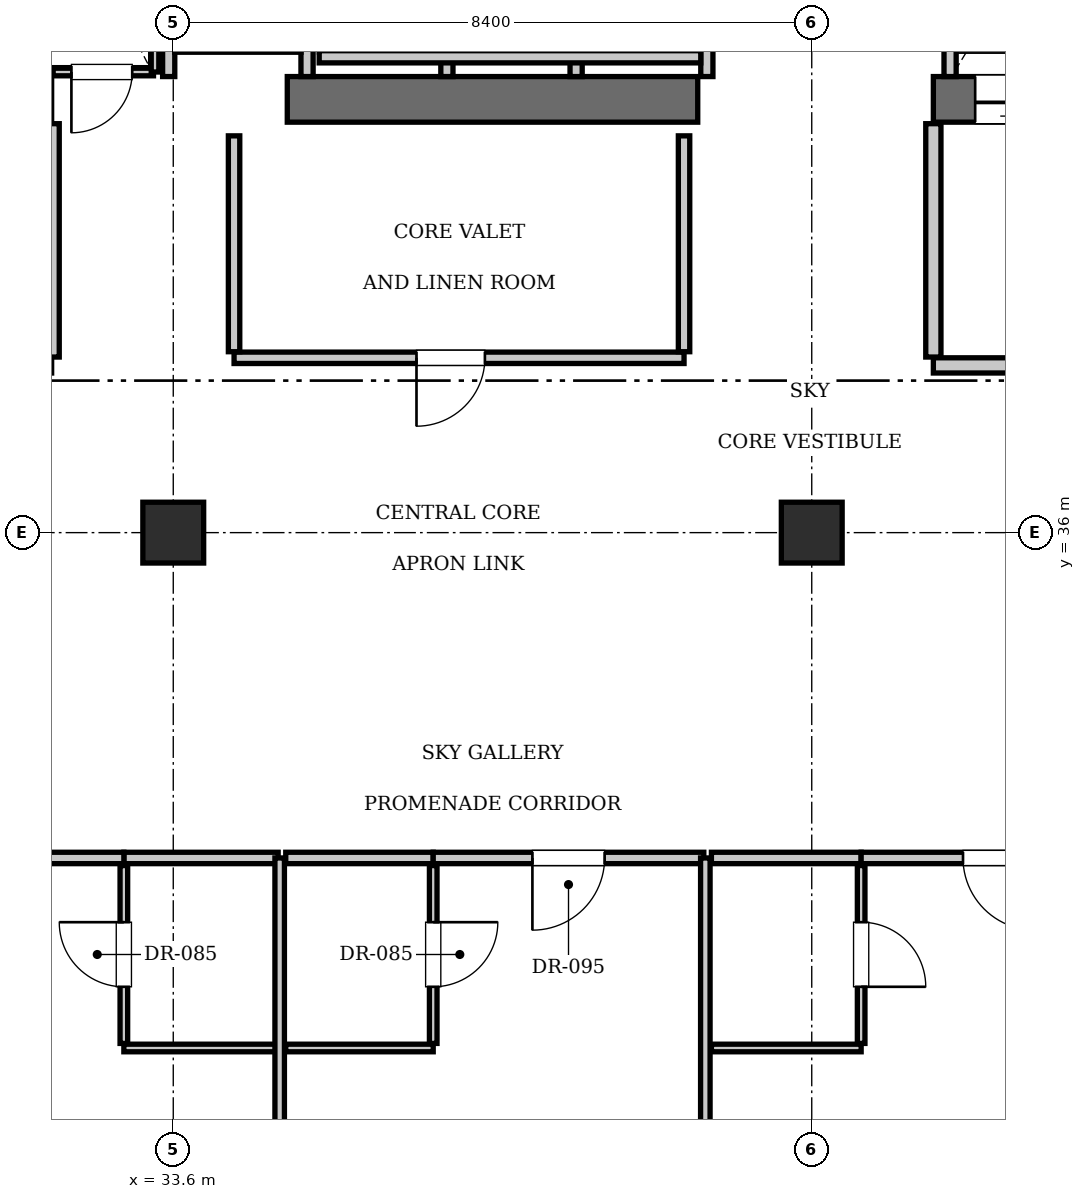
"""IFC4 building model, lengths in metres.
Left out: names, types, materials, properties, quantities, classifications, styles, units other than length and angle.
Written with IfcOpenShell. Run it as: python <this file> out.ifc"""

import sys

from ifc_helpers import new_model, si_unit, direction, frame, frame_2d, origin, origin_2d, place, context, subcontext, project, spatial, rectangle, extrude, element, fill, save


model = new_model("IFC4")
c1 = context("Model", 3, precision=1e-05, world=origin(), true_north=direction((0.0, 1.0)))
c2 = subcontext(c1, "Body", "Model", "MODEL_VIEW")
j1 = project(units=[si_unit("LENGTHUNIT", "METRE"), si_unit("PLANEANGLEUNIT", "RADIAN")], contexts=[c1])
p1 = place(None, origin())
s1 = spatial("IfcSite", under=j1, at=p1, CompositionType="ELEMENT")
p2 = place(p1, origin())
s2 = spatial("IfcBuilding", under=s1, at=p2, CompositionType="ELEMENT")
p3 = place(p2, frame((0.0, 0.0, 329.7)))
s3 = spatial("IfcBuildingStorey", under=s2, at=p3, CompositionType="ELEMENT", Elevation=329.7)
p4 = place(p3, frame((35.1, 41.7, 0.0), z_axis=(0.0, 0.0, 1.0), x_axis=(1.0, 0.0, 0.0)))
e1 = element("IfcWall", 1, at=p4, inside=s3, PredefinedType="SHEAR", context=c2, shape_type="SweptSolid", body=[
    extrude(rectangle(XDim=5.4, YDim=0.6, at=frame_2d((2.7, 0.0))), origin(), (0.0, 0.0, 1.0), 3.85),
])
p5 = place(p3, frame((43.6, 41.7, 0.0), z_axis=(0.0, 0.0, 1.0), x_axis=(1.0, 0.0, 0.0)))
e2 = element("IfcWall", 2, at=p5, inside=s3, PredefinedType="SHEAR", context=c2, shape_type="SweptSolid", body=[
    extrude(rectangle(XDim=6.8, YDim=0.6, at=frame_2d((3.4, 0.0))), origin(), (0.0, 0.0, 1.0), 3.85),
])
p6 = place(p5, frame((3.9, 0.0, 0.0)))
e3 = element("IfcOpeningElement", 3, at=p6, cuts=e2, PredefinedType="OPENING", context=c2, shape_type="SweptSolid", body=[
    extrude(rectangle(XDim=1.15, YDim=2.15, at=frame_2d((0.575, 1.075))), frame((0.0, 0.31, 0.0), z_axis=(0.0, -1.0, 0.0), x_axis=(1.0, 0.0, 0.0)), (0.0, 0.0, 1.0), 0.62),
])
p7 = place(p5, frame((0.55, 0.0, 0.0)))
e4 = element("IfcOpeningElement", 4, at=p7, cuts=e2, PredefinedType="OPENING", context=c2, shape_type="SweptSolid", body=[
    extrude(rectangle(XDim=1.1, YDim=2.2, at=frame_2d((0.55, 1.1))), frame((0.0, 0.31, 0.0), z_axis=(0.0, -1.0, 0.0), x_axis=(1.0, 0.0, 0.0)), (0.0, 0.0, 1.0), 0.62),
])
for number, where, z_axis, x_axis in (
    (5, (33.6, 36.0, 0.0), (0.0, 0.0, 1.0), (1.0, 0.0, 0.0)),
    (6, (42.0, 36.0, 0.0), (0.0, 0.0, 1.0), (1.0, 0.0, 0.0)),
):
    element("IfcColumn", number, at=place(p3, frame(where, z_axis=z_axis, x_axis=x_axis)), inside=s3, PredefinedType="COLUMN", context=c2, shape_type="SweptSolid", body=[
        extrude(rectangle(XDim=0.8, YDim=0.8, at=origin_2d()), origin(), (0.0, 0.0, 1.0), 3.85),
    ])
p8 = place(p3, frame((43.82, 42.0, 0.0), z_axis=(0.0, 0.0, 1.0), x_axis=(0.0, 1.0, 0.0)))
e7 = element("IfcWall", 7, at=p8, inside=s3, PredefinedType="SOLIDWALL", context=c2, shape_type="SweptSolid", body=[
    extrude(rectangle(XDim=2.74, YDim=0.16, at=frame_2d((1.37, 0.0))), origin(), (0.0, 0.0, 1.0), 3.61),
])
for number, where, z_axis, x_axis in (
    (8, (37.2, 42.0, 0.0), (0.0, 0.0, 1.0), (0.0, 1.0, 0.0)),
    (9, (38.9, 42.0, 0.0), (0.0, 0.0, 1.0), (0.0, 1.0, 0.0)),
    (10, (40.62, 42.0, 0.0), (0.0, 0.0, 1.0), (0.0, 1.0, 0.0)),
):
    element("IfcWall", number, at=place(p3, frame(where, z_axis=z_axis, x_axis=x_axis)), inside=s3, PredefinedType="SOLIDWALL", context=c2, shape_type="SweptSolid", body=[
        extrude(rectangle(XDim=2.35, YDim=0.16, at=frame_2d((1.175, 0.0))), origin(), (0.0, 0.0, 1.0), 3.61),
    ])
p9 = place(p3, frame((35.52, 42.26, 0.0), z_axis=(0.0, 0.0, 1.0), x_axis=(1.0, 0.0, 0.0)))
e11 = element("IfcWall", 11, at=p9, inside=s3, PredefinedType="SOLIDWALL", context=c2, shape_type="SweptSolid", body=[
    extrude(rectangle(XDim=5.02, YDim=0.16, at=frame_2d((2.51, 0.0))), origin(), (0.0, 0.0, 1.0), 3.61),
])
for number, where, z_axis, x_axis in (
    (12, (33.54, 42.0, 0.0), (0.0, 0.0, 1.0), (0.0, 1.0, 0.0)),
    (13, (35.36, 42.0, 0.0), (0.0, 0.0, 1.0), (0.0, 1.0, 0.0)),
):
    element("IfcWall", number, at=place(p3, frame(where, z_axis=z_axis, x_axis=x_axis)), inside=s3, PredefinedType="SOLIDWALL", context=c2, shape_type="SweptSolid", body=[
        extrude(rectangle(XDim=2.4, YDim=0.16, at=frame_2d((1.2, 0.0))), origin(), (0.0, 0.0, 1.0), 3.61),
    ])
p10 = place(p3, frame((33.62, 42.4, 0.0), z_axis=(0.0, 0.0, 1.0), x_axis=(1.0, 0.0, 0.0)))
e14 = element("IfcWall", 14, at=p10, inside=s3, PredefinedType="SOLIDWALL", context=c2, shape_type="SweptSolid", body=[
    extrude(rectangle(XDim=1.66, YDim=0.16, at=frame_2d((0.83, 0.0))), origin(), (0.0, 0.0, 1.0), 3.61),
])
p11 = place(p3, frame((32.0, 38.31, 0.0), z_axis=(0.0, 0.0, 1.0), x_axis=(0.0, 1.0, 0.0)))
e15 = element("IfcWall", 15, at=p11, inside=s3, PredefinedType="PARTITIONING", context=c2, shape_type="SweptSolid", body=[
    extrude(rectangle(XDim=3.07, YDim=0.2, at=frame_2d((1.535, 0.0))), origin(), (0.0, 0.0, 1.0), 3.61),
])
p12 = place(p3, frame((43.6, 38.2, 0.0), z_axis=(0.0, 0.0, 1.0), x_axis=(1.0, 0.0, 0.0)))
e16 = element("IfcWall", 16, at=p12, inside=s3, PredefinedType="PARTITIONING", context=c2, shape_type="SweptSolid", body=[
    extrude(rectangle(XDim=5.8, YDim=0.2, at=frame_2d((2.9, 0.0))), origin(), (0.0, 0.0, 1.0), 3.61),
])
p13 = place(p12, frame((2.3, 0.0, 0.0)))
e17 = element("IfcOpeningElement", 17, at=p13, cuts=e16, PredefinedType="OPENING", context=c2, shape_type="SweptSolid", body=[
    extrude(rectangle(XDim=1.15, YDim=2.15, at=frame_2d((0.575, 1.075))), frame((0.0, 0.11, 0.0), z_axis=(0.0, -1.0, 0.0), x_axis=(1.0, 0.0, 0.0)), (0.0, 0.0, 1.0), 0.22),
])
p14 = place(p3, frame((43.6, 38.31, 0.0), z_axis=(0.0, 0.0, 1.0), x_axis=(0.0, 1.0, 0.0)))
e18 = element("IfcWall", 18, at=p14, inside=s3, PredefinedType="PARTITIONING", context=c2, shape_type="SweptSolid", body=[
    extrude(rectangle(XDim=3.07, YDim=0.2, at=frame_2d((1.535, 0.0))), origin(), (0.0, 0.0, 1.0), 3.61),
])
p15 = place(p3, frame((32.02, 42.06, 0.0), z_axis=(0.0, 0.0, 1.0), x_axis=(1.0, 0.0, 0.0)))
e19 = element("IfcWall", 19, at=p15, inside=s3, PredefinedType="PARTITIONING", context=c2, shape_type="SweptSolid", body=[
    extrude(rectangle(XDim=1.32, YDim=0.1, at=frame_2d((0.66, 0.0))), origin(), (0.0, 0.0, 1.0), 3.61),
])
p16 = place(p15, frame((0.24, 0.0, 0.0)))
e20 = element("IfcOpeningElement", 20, at=p16, cuts=e19, PredefinedType="OPENING", context=c2, shape_type="SweptSolid", body=[
    extrude(rectangle(XDim=0.8, YDim=2.05, at=frame_2d((0.4, 1.025))), frame((0.0, 0.06, 0.0), z_axis=(0.0, -1.0, 0.0), x_axis=(1.0, 0.0, 0.0)), (0.0, 0.0, 1.0), 0.12),
])
p17 = place(p3, frame((33.36, 42.06, 0.0), z_axis=(0.0, 0.0, 1.0), x_axis=(0.0, 1.0, 0.0)))
e21 = element("IfcWall", 21, at=p17, inside=s3, PredefinedType="PARTITIONING", context=c2, shape_type="SweptSolid", body=[
    extrude(rectangle(XDim=2.88, YDim=0.1, at=frame_2d((1.44, 0.0))), origin(), (0.0, 0.0, 1.0), 3.61),
])
p18 = place(p3, frame((34.4, 38.3, 0.0), z_axis=(0.0, 0.0, 1.0), x_axis=(1.0, 0.0, 0.0)))
e22 = element("IfcWall", 22, at=p18, inside=s3, PredefinedType="PARTITIONING", context=c2, shape_type="SweptSolid", body=[
    extrude(rectangle(XDim=5.92, YDim=0.15, at=frame_2d((2.96, 0.0))), origin(), (0.0, 0.0, 1.0), 3.61),
])
p19 = place(p18, frame((2.4, 0.0, 0.0)))
e23 = element("IfcOpeningElement", 23, at=p19, cuts=e22, PredefinedType="OPENING", context=c2, shape_type="SweptSolid", body=[
    extrude(rectangle(XDim=0.9, YDim=2.1, at=frame_2d((0.45, 1.05))), frame((0.0, 0.085, 0.0), z_axis=(0.0, -1.0, 0.0), x_axis=(1.0, 0.0, 0.0)), (0.0, 0.0, 1.0), 0.17),
])
for number, where, z_axis, x_axis in (
    (24, (34.4, 38.38, 0.0), (0.0, 0.0, 1.0), (0.0, 1.0, 0.0)),
    (25, (40.32, 38.38, 0.0), (0.0, 0.0, 1.0), (0.0, 1.0, 0.0)),
):
    element("IfcWall", number, at=place(p3, frame(where, z_axis=z_axis, x_axis=x_axis)), inside=s3, PredefinedType="PARTITIONING", context=c2, shape_type="SweptSolid", body=[
        extrude(rectangle(XDim=2.84, YDim=0.15, at=frame_2d((1.42, 0.0))), origin(), (0.0, 0.0, 1.0), 3.61),
    ])
p20 = place(p3, frame((32.95, 31.72, 0.0), z_axis=(0.0, 0.0, 1.0), x_axis=(1.0, 0.0, 0.0)))
e26 = element("IfcWall", 26, at=p20, inside=s3, PredefinedType="PARTITIONING", context=c2, shape_type="SweptSolid", body=[
    extrude(rectangle(XDim=2.03, YDim=0.15, at=frame_2d((1.015, 0.0))), origin(), (0.0, 0.0, 1.0), 3.61),
])
p21 = place(p3, frame((32.95, 29.22, 0.0), z_axis=(0.0, 0.0, 1.0), x_axis=(1.0, 0.0, 0.0)))
e27 = element("IfcWall", 27, at=p21, inside=s3, PredefinedType="PARTITIONING", context=c2, shape_type="SweptSolid", body=[
    extrude(rectangle(XDim=2.01, YDim=0.1, at=frame_2d((1.005, 0.0))), origin(), (0.0, 0.0, 1.0), 3.61),
])
p22 = place(p3, frame((32.95, 29.28, 0.0), z_axis=(0.0, 0.0, 1.0), x_axis=(0.0, 1.0, 0.0)))
e28 = element("IfcWall", 28, at=p22, inside=s3, PredefinedType="PARTITIONING", context=c2, shape_type="SweptSolid", body=[
    extrude(rectangle(XDim=2.34, YDim=0.1, at=frame_2d((1.17, 0.0))), origin(), (0.0, 0.0, 1.0), 3.61),
])
p23 = place(p22, frame((0.745, 0.0, 0.0)))
e29 = element("IfcOpeningElement", 29, at=p23, cuts=e28, PredefinedType="OPENING", context=c2, shape_type="SweptSolid", body=[
    extrude(rectangle(XDim=0.85, YDim=2.1, at=frame_2d((0.425, 1.05))), frame((0.0, 0.06, 0.0), z_axis=(0.0, -1.0, 0.0), x_axis=(1.0, 0.0, 0.0)), (0.0, 0.0, 1.0), 0.12),
])
p24 = place(p3, frame((29.32, 31.72, 0.0), z_axis=(0.0, 0.0, 1.0), x_axis=(1.0, 0.0, 0.0)))
e30 = element("IfcWall", 30, at=p24, inside=s3, PredefinedType="PARTITIONING", context=c2, shape_type="SweptSolid", body=[
    extrude(rectangle(XDim=3.63, YDim=0.15, at=frame_2d((1.815, 0.0))), origin(), (0.0, 0.0, 1.0), 3.61),
])
p25 = place(p24, frame((1.34, 0.0, 0.0)))
e31 = element("IfcOpeningElement", 31, at=p25, cuts=e30, PredefinedType="OPENING", context=c2, shape_type="SweptSolid", body=[
    extrude(rectangle(XDim=0.95, YDim=2.15, at=frame_2d((0.475, 1.075))), frame((0.0, 0.085, 0.0), z_axis=(0.0, -1.0, 0.0), x_axis=(1.0, 0.0, 0.0)), (0.0, 0.0, 1.0), 0.17),
])
p26 = place(p3, frame((35.0, 13.9, 0.0), z_axis=(0.0, 0.0, 1.0), x_axis=(0.0, 1.0, 0.0)))
e32 = element("IfcWall", 32, at=p26, inside=s3, PredefinedType="PARTITIONING", context=c2, shape_type="SweptSolid", body=[
    extrude(rectangle(XDim=17.82, YDim=0.125, at=frame_2d((8.91, 0.0))), origin(), (0.0, 0.0, 1.0), 3.61),
])
p27 = place(p3, frame((35.08, 31.72, 0.0), z_axis=(0.0, 0.0, 1.0), x_axis=(1.0, 0.0, 0.0)))
e33 = element("IfcWall", 33, at=p27, inside=s3, PredefinedType="PARTITIONING", context=c2, shape_type="SweptSolid", body=[
    extrude(rectangle(XDim=1.94, YDim=0.15, at=frame_2d((0.97, 0.0))), origin(), (0.0, 0.0, 1.0), 3.61),
])
p28 = place(p3, frame((35.08, 29.22, 0.0), z_axis=(0.0, 0.0, 1.0), x_axis=(1.0, 0.0, 0.0)))
e34 = element("IfcWall", 34, at=p28, inside=s3, PredefinedType="PARTITIONING", context=c2, shape_type="SweptSolid", body=[
    extrude(rectangle(XDim=1.94, YDim=0.1, at=frame_2d((0.97, 0.0))), origin(), (0.0, 0.0, 1.0), 3.61),
])
p29 = place(p3, frame((37.02, 29.28, 0.0), z_axis=(0.0, 0.0, 1.0), x_axis=(0.0, 1.0, 0.0)))
e35 = element("IfcWall", 35, at=p29, inside=s3, PredefinedType="PARTITIONING", context=c2, shape_type="SweptSolid", body=[
    extrude(rectangle(XDim=2.34, YDim=0.1, at=frame_2d((1.17, 0.0))), origin(), (0.0, 0.0, 1.0), 3.61),
])
p30 = place(p29, frame((0.745, 0.0, 0.0)))
e36 = element("IfcOpeningElement", 36, at=p30, cuts=e35, PredefinedType="OPENING", context=c2, shape_type="SweptSolid", body=[
    extrude(rectangle(XDim=0.85, YDim=2.1, at=frame_2d((0.425, 1.05))), frame((0.0, 0.06, 0.0), z_axis=(0.0, -1.0, 0.0), x_axis=(1.0, 0.0, 0.0)), (0.0, 0.0, 1.0), 0.12),
])
p31 = place(p3, frame((37.02, 31.72, 0.0), z_axis=(0.0, 0.0, 1.0), x_axis=(1.0, 0.0, 0.0)))
e37 = element("IfcWall", 37, at=p31, inside=s3, PredefinedType="PARTITIONING", context=c2, shape_type="SweptSolid", body=[
    extrude(rectangle(XDim=3.56, YDim=0.15, at=frame_2d((1.78, 0.0))), origin(), (0.0, 0.0, 1.0), 3.61),
])
p32 = place(p31, frame((1.305, 0.0, 0.0)))
e38 = element("IfcOpeningElement", 38, at=p32, cuts=e37, PredefinedType="OPENING", context=c2, shape_type="SweptSolid", body=[
    extrude(rectangle(XDim=0.95, YDim=2.15, at=frame_2d((0.475, 1.075))), frame((0.0, 0.085, 0.0), z_axis=(0.0, -1.0, 0.0), x_axis=(1.0, 0.0, 0.0)), (0.0, 0.0, 1.0), 0.17),
])
p33 = place(p3, frame((40.6, 13.9, 0.0), z_axis=(0.0, 0.0, 1.0), x_axis=(0.0, 1.0, 0.0)))
e39 = element("IfcWall", 39, at=p33, inside=s3, PredefinedType="PARTITIONING", context=c2, shape_type="SweptSolid", body=[
    extrude(rectangle(XDim=17.82, YDim=0.125, at=frame_2d((8.91, 0.0))), origin(), (0.0, 0.0, 1.0), 3.61),
])
p34 = place(p3, frame((40.68, 31.72, 0.0), z_axis=(0.0, 0.0, 1.0), x_axis=(1.0, 0.0, 0.0)))
e40 = element("IfcWall", 40, at=p34, inside=s3, PredefinedType="PARTITIONING", context=c2, shape_type="SweptSolid", body=[
    extrude(rectangle(XDim=1.97, YDim=0.15, at=frame_2d((0.985, 0.0))), origin(), (0.0, 0.0, 1.0), 3.61),
])
p35 = place(p3, frame((40.68, 29.22, 0.0), z_axis=(0.0, 0.0, 1.0), x_axis=(1.0, 0.0, 0.0)))
e41 = element("IfcWall", 41, at=p35, inside=s3, PredefinedType="PARTITIONING", context=c2, shape_type="SweptSolid", body=[
    extrude(rectangle(XDim=1.97, YDim=0.1, at=frame_2d((0.985, 0.0))), origin(), (0.0, 0.0, 1.0), 3.61),
])
p36 = place(p3, frame((42.65, 29.28, 0.0), z_axis=(0.0, 0.0, 1.0), x_axis=(0.0, 1.0, 0.0)))
e42 = element("IfcWall", 42, at=p36, inside=s3, PredefinedType="PARTITIONING", context=c2, shape_type="SweptSolid", body=[
    extrude(rectangle(XDim=2.34, YDim=0.1, at=frame_2d((1.17, 0.0))), origin(), (0.0, 0.0, 1.0), 3.61),
])
p37 = place(p36, frame((0.745, 0.0, 0.0)))
e43 = element("IfcOpeningElement", 43, at=p37, cuts=e42, PredefinedType="OPENING", context=c2, shape_type="SweptSolid", body=[
    extrude(rectangle(XDim=0.85, YDim=2.1, at=frame_2d((0.425, 1.05))), frame((0.0, 0.06, 0.0), z_axis=(0.0, -1.0, 0.0), x_axis=(1.0, 0.0, 0.0)), (0.0, 0.0, 1.0), 0.12),
])
p38 = place(p3, frame((42.65, 31.72, 0.0), z_axis=(0.0, 0.0, 1.0), x_axis=(1.0, 0.0, 0.0)))
e44 = element("IfcWall", 44, at=p38, inside=s3, PredefinedType="PARTITIONING", context=c2, shape_type="SweptSolid", body=[
    extrude(rectangle(XDim=3.63, YDim=0.15, at=frame_2d((1.815, 0.0))), origin(), (0.0, 0.0, 1.0), 3.61),
])
p39 = place(p38, frame((1.34, 0.0, 0.0)))
e45 = element("IfcOpeningElement", 45, at=p39, cuts=e44, PredefinedType="OPENING", context=c2, shape_type="SweptSolid", body=[
    extrude(rectangle(XDim=0.95, YDim=2.15, at=frame_2d((0.475, 1.075))), frame((0.0, 0.085, 0.0), z_axis=(0.0, -1.0, 0.0), x_axis=(1.0, 0.0, 0.0)), (0.0, 0.0, 1.0), 0.17),
])
p40 = place(p7, frame((1.1, 0.0, 0.0), z_axis=(0.0, 0.0, 1.0), x_axis=(-1.0, 0.0, 0.0)))
e46 = element("IfcDoor", 46, at=p40, inside=s3, OperationType="SLIDING_TO_LEFT", PredefinedType="DOOR", context=c2, shape_type="SweptSolid", body=[
    extrude(rectangle(XDim=1.1, YDim=2.2, at=frame_2d((0.55, 1.1))), frame((0.0, 0.025, 0.0), z_axis=(0.0, -1.0, 0.0), x_axis=(1.0, 0.0, 0.0)), (0.0, 0.0, 1.0), 0.05),
])
fill(e4, e46)
p41 = place(p16, frame((0.8, 0.0, 0.0), z_axis=(0.0, 0.0, 1.0), x_axis=(-1.0, 0.0, 0.0)))
e47 = element("IfcDoor", 47, at=p41, inside=s3, OperationType="SINGLE_SWING_RIGHT", PredefinedType="DOOR", context=c2, shape_type="SweptSolid", body=[
    extrude(rectangle(XDim=0.8, YDim=2.05, at=frame_2d((0.4, 1.025))), frame((0.0, 0.025, 0.0), z_axis=(0.0, -1.0, 0.0), x_axis=(1.0, 0.0, 0.0)), (0.0, 0.0, 1.0), 0.05),
])
fill(e20, e47)
p42 = place(p19, frame((0.9, 0.0, 0.0), z_axis=(0.0, 0.0, 1.0), x_axis=(-1.0, 0.0, 0.0)))
e48 = element("IfcDoor", 48, at=p42, inside=s3, OperationType="SINGLE_SWING_RIGHT", PredefinedType="DOOR", context=c2, shape_type="SweptSolid", body=[
    extrude(rectangle(XDim=0.9, YDim=2.1, at=frame_2d((0.45, 1.05))), frame((0.0, 0.025, 0.0), z_axis=(0.0, -1.0, 0.0), x_axis=(1.0, 0.0, 0.0)), (0.0, 0.0, 1.0), 0.05),
])
fill(e23, e48)
p43 = place(p23, origin())
e49 = element("IfcDoor", 49, at=p43, inside=s3, OperationType="SINGLE_SWING_RIGHT", PredefinedType="DOOR", context=c2, shape_type="SweptSolid", body=[
    extrude(rectangle(XDim=0.85, YDim=2.1, at=frame_2d((0.425, 1.05))), frame((0.0, 0.025, 0.0), z_axis=(0.0, -1.0, 0.0), x_axis=(1.0, 0.0, 0.0)), (0.0, 0.0, 1.0), 0.05),
])
fill(e29, e49)
p44 = place(p30, frame((0.85, 0.0, 0.0), z_axis=(0.0, 0.0, 1.0), x_axis=(-1.0, 0.0, 0.0)))
e50 = element("IfcDoor", 50, at=p44, inside=s3, OperationType="SINGLE_SWING_LEFT", PredefinedType="DOOR", context=c2, shape_type="SweptSolid", body=[
    extrude(rectangle(XDim=0.85, YDim=2.1, at=frame_2d((0.425, 1.05))), frame((0.0, 0.025, 0.0), z_axis=(0.0, -1.0, 0.0), x_axis=(1.0, 0.0, 0.0)), (0.0, 0.0, 1.0), 0.05),
])
fill(e36, e50)
p45 = place(p32, frame((0.95, 0.0, 0.0), z_axis=(0.0, 0.0, 1.0), x_axis=(-1.0, 0.0, 0.0)))
e51 = element("IfcDoor", 51, at=p45, inside=s3, OperationType="SINGLE_SWING_RIGHT", PredefinedType="DOOR", context=c2, shape_type="SweptSolid", body=[
    extrude(rectangle(XDim=0.95, YDim=2.15, at=frame_2d((0.475, 1.075))), frame((0.0, 0.025, 0.0), z_axis=(0.0, -1.0, 0.0), x_axis=(1.0, 0.0, 0.0)), (0.0, 0.0, 1.0), 0.05),
])
fill(e38, e51)
p46 = place(p37, frame((0.85, 0.0, 0.0), z_axis=(0.0, 0.0, 1.0), x_axis=(-1.0, 0.0, 0.0)))
e52 = element("IfcDoor", 52, at=p46, inside=s3, OperationType="SINGLE_SWING_RIGHT", PredefinedType="DOOR", context=c2, shape_type="SweptSolid", body=[
    extrude(rectangle(XDim=0.85, YDim=2.1, at=frame_2d((0.425, 1.05))), frame((0.0, 0.025, 0.0), z_axis=(0.0, -1.0, 0.0), x_axis=(1.0, 0.0, 0.0)), (0.0, 0.0, 1.0), 0.05),
])
fill(e43, e52)
p47 = place(p39, frame((0.95, 0.0, 0.0), z_axis=(0.0, 0.0, 1.0), x_axis=(-1.0, 0.0, 0.0)))
e53 = element("IfcDoor", 53, at=p47, inside=s3, OperationType="SINGLE_SWING_LEFT", PredefinedType="DOOR", context=c2, shape_type="SweptSolid", body=[
    extrude(rectangle(XDim=0.95, YDim=2.15, at=frame_2d((0.475, 1.075))), frame((0.0, 0.025, 0.0), z_axis=(0.0, -1.0, 0.0), x_axis=(1.0, 0.0, 0.0)), (0.0, 0.0, 1.0), 0.05),
])
fill(e45, e53)
save(model, sys.argv[1])
